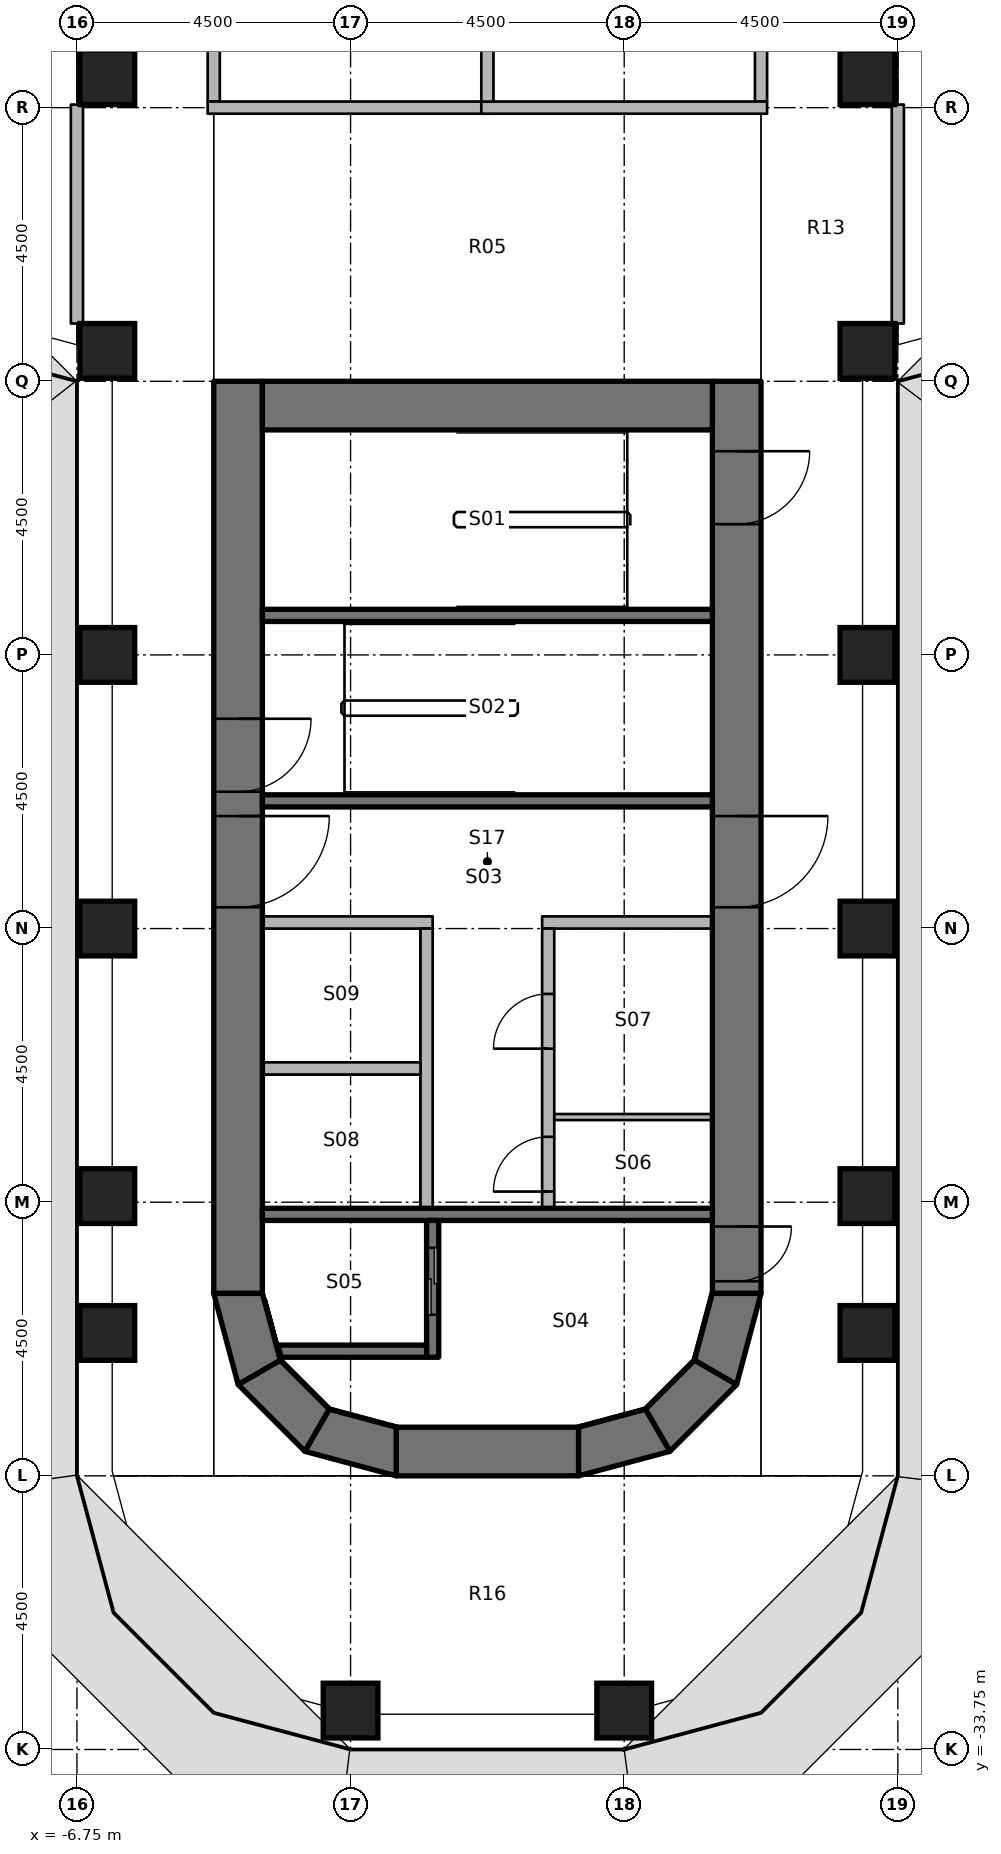
"""IFC4 building model, lengths in metres.
Left out: names, types, materials, properties, quantities, classifications, styles, units other than length and angle.
Written with IfcOpenShell. Run it as: python <this file> out.ifc"""

import sys

from ifc_helpers import new_model, si_unit, direction, frame, frame_2d, origin, origin_2d, place, context, subcontext, project, spatial, polyline, rectangle, outline, extrude, element, fill, save


model = new_model("IFC4")
c1 = context("Model", 3, precision=1e-05, world=origin(), true_north=direction((0.0, 1.0)))
c2 = subcontext(c1, "Body", "Model", "MODEL_VIEW")
j1 = project(units=[si_unit("LENGTHUNIT", "METRE"), si_unit("PLANEANGLEUNIT", "RADIAN")], contexts=[c1])
p1 = place(None, origin())
s1 = spatial("IfcSite", under=j1, at=p1, CompositionType="ELEMENT")
p2 = place(p1, origin())
s2 = spatial("IfcBuilding", under=s1, at=p2, CompositionType="ELEMENT")
p3 = place(p2, frame((0.0, 0.0, 98.0)))
s3 = spatial("IfcBuildingStorey", under=s2, at=p3, CompositionType="ELEMENT", Elevation=98.0)
for number, where, z_axis, x_axis in (
    (1, (-6.25, -26.9, 0.0), (0.0, 0.0, 1.0), (1.0, 0.0, 0.0)),
    (2, (-6.25, -24.65, 0.0), (0.0, 0.0, 1.0), (1.0, 0.0, 0.0)),
    (3, (-6.25, -20.25, 0.0), (0.0, 0.0, 1.0), (1.0, 0.0, 0.0)),
    (4, (-6.25, -15.75, 0.0), (0.0, 0.0, 1.0), (1.0, 0.0, 0.0)),
    (5, (-6.25, -10.75, 0.0), (0.0, 0.0, 1.0), (1.0, 0.0, 0.0)),
    (6, (-6.25, -6.25, 0.0), (0.0, 0.0, 1.0), (1.0, 0.0, 0.0)),
    (7, (-2.25, -33.11, 0.0), (0.0, 0.0, 1.0), (1.0, 0.0, 0.0)),
    (8, (2.25, -33.11, 0.0), (0.0, 0.0, 1.0), (1.0, 0.0, 0.0)),
    (9, (6.25, -26.9, 0.0), (0.0, 0.0, 1.0), (1.0, 0.0, 0.0)),
    (10, (6.25, -24.65, 0.0), (0.0, 0.0, 1.0), (1.0, 0.0, 0.0)),
    (11, (6.25, -20.25, 0.0), (0.0, 0.0, 1.0), (1.0, 0.0, 0.0)),
    (12, (6.25, -15.75, 0.0), (0.0, 0.0, 1.0), (1.0, 0.0, 0.0)),
    (13, (6.25, -10.75, 0.0), (0.0, 0.0, 1.0), (1.0, 0.0, 0.0)),
    (14, (6.25, -6.25, 0.0), (0.0, 0.0, 1.0), (1.0, 0.0, 0.0)),
):
    element("IfcColumn", number, at=place(p3, frame(where, z_axis=z_axis, x_axis=x_axis)), inside=s3, PredefinedType="COLUMN", context=c2, shape_type="SweptSolid", body=[
        extrude(rectangle(XDim=0.9, YDim=0.9, at=origin_2d()), origin(), (0.0, 0.0, 1.0), 3.65),
    ])
p4 = place(p3, frame((-4.1, -11.25, 0.0), z_axis=(0.0, 0.0, 1.0), x_axis=(0.0, -1.0, 0.0)))
e15 = element("IfcWall", 15, at=p4, inside=s3, PredefinedType="SHEAR", context=c2, shape_type="SweptSolid", body=[
    extrude(rectangle(XDim=15.0, YDim=0.8, at=frame_2d((7.5, 0.0))), origin(), (0.0, 0.0, 1.0), 3.8),
])
p5 = place(p4, frame((7.15, 0.0, 0.0)))
e16 = element("IfcOpeningElement", 16, at=p5, cuts=e15, PredefinedType="OPENING", context=c2, shape_type="SweptSolid", body=[
    extrude(rectangle(XDim=1.5, YDim=2.3, at=frame_2d((0.75, 1.15))), frame((0.0, 0.41, 0.0), z_axis=(0.0, -1.0, 0.0), x_axis=(1.0, 0.0, 0.0)), (0.0, 0.0, 1.0), 0.82),
])
p6 = place(p4, frame((5.55, 0.0, 0.0)))
e17 = element("IfcOpeningElement", 17, at=p6, cuts=e15, PredefinedType="OPENING", context=c2, shape_type="SweptSolid", body=[
    extrude(rectangle(XDim=1.2, YDim=2.1, at=frame_2d((0.6, 1.05))), frame((0.0, 0.41, 0.0), z_axis=(0.0, -1.0, 0.0), x_axis=(1.0, 0.0, 0.0)), (0.0, 0.0, 1.0), 0.82),
])
p7 = place(p3, frame((4.1, -11.25, 0.0), z_axis=(0.0, 0.0, 1.0), x_axis=(0.0, -1.0, 0.0)))
e18 = element("IfcWall", 18, at=p7, inside=s3, PredefinedType="SHEAR", context=c2, shape_type="SweptSolid", body=[
    extrude(rectangle(XDim=15.0, YDim=0.8, at=frame_2d((7.5, 0.0))), origin(), (0.0, 0.0, 1.0), 3.8),
])
p8 = place(p7, frame((7.15, 0.0, 0.0)))
e19 = element("IfcOpeningElement", 19, at=p8, cuts=e18, PredefinedType="OPENING", context=c2, shape_type="SweptSolid", body=[
    extrude(rectangle(XDim=1.5, YDim=2.3, at=frame_2d((0.75, 1.15))), frame((0.0, 0.41, 0.0), z_axis=(0.0, -1.0, 0.0), x_axis=(1.0, 0.0, 0.0)), (0.0, 0.0, 1.0), 0.82),
])
p9 = place(p7, frame((13.9, 0.0, 0.0)))
e20 = element("IfcOpeningElement", 20, at=p9, cuts=e18, PredefinedType="OPENING", context=c2, shape_type="SweptSolid", body=[
    extrude(rectangle(XDim=0.9, YDim=2.1, at=frame_2d((0.45, 1.05))), frame((0.0, 0.41, 0.0), z_axis=(0.0, -1.0, 0.0), x_axis=(1.0, 0.0, 0.0)), (0.0, 0.0, 1.0), 0.82),
])
p10 = place(p7, frame((1.15, 0.0, 0.0)))
e21 = element("IfcOpeningElement", 21, at=p10, cuts=e18, PredefinedType="OPENING", context=c2, shape_type="SweptSolid", body=[
    extrude(rectangle(XDim=1.2, YDim=2.1, at=frame_2d((0.6, 1.05))), frame((0.0, 0.41, 0.0), z_axis=(0.0, -1.0, 0.0), x_axis=(1.0, 0.0, 0.0)), (0.0, 0.0, 1.0), 0.82),
])
p11 = place(p3, frame((-3.7, -11.65, 0.0), z_axis=(0.0, 0.0, 1.0), x_axis=(1.0, 0.0, 0.0)))
e22 = element("IfcWall", 22, at=p11, inside=s3, PredefinedType="SHEAR", context=c2, shape_type="SweptSolid", body=[
    extrude(rectangle(XDim=7.4, YDim=0.8, at=frame_2d((3.7, 0.0))), origin(), (0.0, 0.0, 1.0), 3.8),
])
p12 = place(p3, frame((-1.5, -28.85, 0.0), z_axis=(0.0, 0.0, 1.0), x_axis=(1.0, 0.0, 0.0)))
e23 = element("IfcWall", 23, at=p12, inside=s3, PredefinedType="SHEAR", context=c2, shape_type="SweptSolid", body=[
    extrude(rectangle(XDim=3.0, YDim=0.8, at=frame_2d((1.5, 0.0))), origin(), (0.0, 0.0, 1.0), 3.8),
])
p13 = place(p3, origin())
e24 = element("IfcWall", 24, at=p13, inside=s3, PredefinedType="SHEAR", context=c2, shape_type="SweptSolid", body=[
    extrude(outline(polyline([(-4.5, -26.25), (-4.098, -27.75), (-3.405, -27.35), (-3.7, -26.25), (-4.5, -26.25)])), origin(), (0.0, 0.0, 1.0), 3.8),
])
p14 = place(p3, origin())
e25 = element("IfcWall", 25, at=p14, inside=s3, PredefinedType="SHEAR", context=c2, shape_type="SweptSolid", body=[
    extrude(outline(polyline([(-4.098, -27.75), (-3.0, -28.848), (-2.6, -28.155), (-3.405, -27.35), (-4.098, -27.75)])), origin(), (0.0, 0.0, 1.0), 3.8),
])
p15 = place(p3, origin())
e26 = element("IfcWall", 26, at=p15, inside=s3, PredefinedType="SHEAR", context=c2, shape_type="SweptSolid", body=[
    extrude(outline(polyline([(-3.0, -28.848), (-1.5, -29.25), (-1.5, -28.45), (-2.6, -28.155), (-3.0, -28.848)])), origin(), (0.0, 0.0, 1.0), 3.8),
])
p16 = place(p3, origin())
e27 = element("IfcWall", 27, at=p16, inside=s3, PredefinedType="SHEAR", context=c2, shape_type="SweptSolid", body=[
    extrude(outline(polyline([(4.5, -26.25), (4.098, -27.75), (3.405, -27.35), (3.7, -26.25), (4.5, -26.25)])), origin(), (0.0, 0.0, 1.0), 3.8),
])
p17 = place(p3, origin())
e28 = element("IfcWall", 28, at=p17, inside=s3, PredefinedType="SHEAR", context=c2, shape_type="SweptSolid", body=[
    extrude(outline(polyline([(4.098, -27.75), (3.0, -28.848), (2.6, -28.155), (3.405, -27.35), (4.098, -27.75)])), origin(), (0.0, 0.0, 1.0), 3.8),
])
p18 = place(p3, origin())
e29 = element("IfcWall", 29, at=p18, inside=s3, PredefinedType="SHEAR", context=c2, shape_type="SweptSolid", body=[
    extrude(outline(polyline([(3.0, -28.848), (1.5, -29.25), (1.5, -28.45), (2.6, -28.155), (3.0, -28.848)])), origin(), (0.0, 0.0, 1.0), 3.8),
])
p19 = place(p3, frame((3.7, -24.95, 0.0), z_axis=(0.0, 0.0, 1.0), x_axis=(-1.0, 0.0, 0.0)))
e30 = element("IfcWall", 30, at=p19, inside=s3, PredefinedType="SHEAR", context=c2, shape_type="SweptSolid", body=[
    extrude(rectangle(XDim=7.4, YDim=0.2, at=frame_2d((3.7, 0.0))), origin(), (0.0, 0.0, 1.0), 3.65),
])
p20 = place(p3, frame((-0.9, -27.3, 0.0), z_axis=(0.0, 0.0, 1.0), x_axis=(0.0, 1.0, 0.0)))
e31 = element("IfcWall", 31, at=p20, inside=s3, PredefinedType="SHEAR", context=c2, shape_type="SweptSolid", body=[
    extrude(rectangle(XDim=2.25, YDim=0.2, at=frame_2d((1.125, 0.0))), origin(), (0.0, 0.0, 1.0), 3.65),
])
p21 = place(p20, frame((0.7, 0.0, 0.0)))
e32 = element("IfcOpeningElement", 32, at=p21, cuts=e31, PredefinedType="OPENING", context=c2, shape_type="SweptSolid", body=[
    extrude(rectangle(XDim=1.1, YDim=2.3, at=frame_2d((0.55, 1.15))), frame((0.0, 0.11, 0.0), z_axis=(0.0, -1.0, 0.0), x_axis=(1.0, 0.0, 0.0)), (0.0, 0.0, 1.0), 0.22),
])
p22 = place(p3, origin())
e33 = element("IfcWall", 33, at=p22, inside=s3, PredefinedType="SHEAR", context=c2, shape_type="SweptSolid", body=[
    extrude(outline(polyline([(-1.0, -27.1), (-3.444, -27.1), (-3.39, -27.3), (-1.0, -27.3), (-1.0, -27.1)])), origin(), (0.0, 0.0, 1.0), 3.65),
])
for number, where, z_axis, x_axis in (
    (34, (3.7, -18.15, 0.0), (0.0, 0.0, 1.0), (-1.0, 0.0, 0.0)),
    (35, (3.7, -15.1, 0.0), (0.0, 0.0, 1.0), (-1.0, 0.0, 0.0)),
):
    element("IfcWall", number, at=place(p3, frame(where, z_axis=z_axis, x_axis=x_axis)), inside=s3, PredefinedType="SHEAR", context=c2, shape_type="SweptSolid", body=[
        extrude(rectangle(XDim=7.4, YDim=0.2, at=frame_2d((3.7, 0.0))), origin(), (0.0, 0.0, 1.0), 3.65),
    ])
p23 = place(p3, frame((3.7, -20.15, 0.0), z_axis=(0.0, 0.0, 1.0), x_axis=(-1.0, 0.0, 0.0)))
e36 = element("IfcWall", 36, at=p23, inside=s3, PredefinedType="PARTITIONING", context=c2, shape_type="SweptSolid", body=[
    extrude(rectangle(XDim=2.8, YDim=0.2, at=frame_2d((1.4, 0.0))), origin(), (0.0, 0.0, 1.0), 3.65),
])
p24 = place(p3, frame((1.0, -24.85, 0.0), z_axis=(0.0, 0.0, 1.0), x_axis=(0.0, 1.0, 0.0)))
e37 = element("IfcWall", 37, at=p24, inside=s3, PredefinedType="PARTITIONING", context=c2, shape_type="SweptSolid", body=[
    extrude(rectangle(XDim=4.6, YDim=0.2, at=frame_2d((2.3, 0.0))), origin(), (0.0, 0.0, 1.0), 3.65),
])
p25 = place(p24, frame((0.275, 0.0, 0.0)))
e38 = element("IfcOpeningElement", 38, at=p25, cuts=e37, PredefinedType="OPENING", context=c2, shape_type="SweptSolid", body=[
    extrude(rectangle(XDim=0.9, YDim=2.1, at=frame_2d((0.45, 1.05))), frame((0.0, 0.11, 0.0), z_axis=(0.0, -1.0, 0.0), x_axis=(1.0, 0.0, 0.0)), (0.0, 0.0, 1.0), 0.22),
])
p26 = place(p24, frame((2.625, 0.0, 0.0)))
e39 = element("IfcOpeningElement", 39, at=p26, cuts=e37, PredefinedType="OPENING", context=c2, shape_type="SweptSolid", body=[
    extrude(rectangle(XDim=0.9, YDim=2.1, at=frame_2d((0.45, 1.05))), frame((0.0, 0.11, 0.0), z_axis=(0.0, -1.0, 0.0), x_axis=(1.0, 0.0, 0.0)), (0.0, 0.0, 1.0), 0.22),
])
p27 = place(p3, frame((-0.9, -20.15, 0.0), z_axis=(0.0, 0.0, 1.0), x_axis=(-1.0, 0.0, 0.0)))
e40 = element("IfcWall", 40, at=p27, inside=s3, PredefinedType="PARTITIONING", context=c2, shape_type="SweptSolid", body=[
    extrude(rectangle(XDim=2.8, YDim=0.2, at=frame_2d((1.4, 0.0))), origin(), (0.0, 0.0, 1.0), 3.65),
])
p28 = place(p3, frame((-1.0, -24.85, 0.0), z_axis=(0.0, 0.0, 1.0), x_axis=(0.0, 1.0, 0.0)))
e41 = element("IfcWall", 41, at=p28, inside=s3, PredefinedType="PARTITIONING", context=c2, shape_type="SweptSolid", body=[
    extrude(rectangle(XDim=4.6, YDim=0.2, at=frame_2d((2.3, 0.0))), origin(), (0.0, 0.0, 1.0), 3.65),
])
p29 = place(p3, frame((3.7, -23.35, 0.0), z_axis=(0.0, 0.0, 1.0), x_axis=(-1.0, 0.0, 0.0)))
e42 = element("IfcWall", 42, at=p29, inside=s3, PredefinedType="PARTITIONING", context=c2, shape_type="SweptSolid", body=[
    extrude(rectangle(XDim=2.6, YDim=0.1, at=frame_2d((1.3, 0.0))), origin(), (0.0, 0.0, 1.0), 3.65),
])
p30 = place(p3, frame((-1.1, -22.55, 0.0), z_axis=(0.0, 0.0, 1.0), x_axis=(-1.0, 0.0, 0.0)))
e43 = element("IfcWall", 43, at=p30, inside=s3, PredefinedType="PARTITIONING", context=c2, shape_type="SweptSolid", body=[
    extrude(rectangle(XDim=2.6, YDim=0.2, at=frame_2d((1.3, 0.0))), origin(), (0.0, 0.0, 1.0), 3.65),
])
p31 = place(p3, frame((-4.5, 6.65, 0.0), z_axis=(0.0, 0.0, 1.0), x_axis=(0.0, -1.0, 0.0)))
e44 = element("IfcWall", 44, at=p31, inside=s3, PredefinedType="PARTITIONING", context=c2, shape_type="SweptSolid", body=[
    extrude(rectangle(XDim=13.3, YDim=0.2, at=frame_2d((6.65, 0.0))), origin(), (0.0, 0.0, 1.0), 2.738),
])
p32 = place(p31, frame((6.15, 0.0, 0.0)))
e45 = element("IfcOpeningElement", 45, at=p32, cuts=e44, PredefinedType="OPENING", context=c2, shape_type="SweptSolid", body=[
    extrude(rectangle(XDim=1.0, YDim=2.1, at=frame_2d((0.5, 1.05))), frame((0.0, 0.11, 0.0), z_axis=(0.0, -1.0, 0.0), x_axis=(1.0, 0.0, 0.0)), (0.0, 0.0, 1.0), 0.22),
])
p33 = place(p3, frame((-6.75, -10.3, 0.0), z_axis=(0.0, 0.0, 1.0), x_axis=(0.0, 1.0, 0.0)))
e46 = element("IfcWall", 46, at=p33, inside=s3, PredefinedType="PARTITIONING", context=c2, shape_type="SweptSolid", body=[
    extrude(rectangle(XDim=3.6, YDim=0.2, at=frame_2d((1.8, 0.0))), origin(), (0.0, 0.0, 1.0), 2.738),
])
p34 = place(p3, frame((4.5, -6.65, 0.0), z_axis=(0.0, 0.0, 1.0), x_axis=(0.0, 1.0, 0.0)))
e47 = element("IfcWall", 47, at=p34, inside=s3, PredefinedType="PARTITIONING", context=c2, shape_type="SweptSolid", body=[
    extrude(rectangle(XDim=6.55, YDim=0.2, at=frame_2d((3.275, 0.0))), origin(), (0.0, 0.0, 1.0), 2.738),
])
p35 = place(p34, frame((2.775, 0.0, 0.0)))
e48 = element("IfcOpeningElement", 48, at=p35, cuts=e47, PredefinedType="OPENING", context=c2, shape_type="SweptSolid", body=[
    extrude(rectangle(XDim=1.0, YDim=2.1, at=frame_2d((0.5, 1.05))), frame((0.0, 0.11, 0.0), z_axis=(0.0, -1.0, 0.0), x_axis=(1.0, 0.0, 0.0)), (0.0, 0.0, 1.0), 0.22),
])
p36 = place(p3, frame((6.75, -10.3, 0.0), z_axis=(0.0, 0.0, 1.0), x_axis=(0.0, 1.0, 0.0)))
e49 = element("IfcWall", 49, at=p36, inside=s3, PredefinedType="PARTITIONING", context=c2, shape_type="SweptSolid", body=[
    extrude(rectangle(XDim=3.6, YDim=0.2, at=frame_2d((1.8, 0.0))), origin(), (0.0, 0.0, 1.0), 2.738),
])
for number, where, z_axis, x_axis in (
    (50, (-4.6, -6.75, 0.0), (0.0, 0.0, 1.0), (1.0, 0.0, 0.0)),
    (51, (-0.1, -6.75, 0.0), (0.0, 0.0, 1.0), (1.0, 0.0, 0.0)),
):
    element("IfcWall", number, at=place(p3, frame(where, z_axis=z_axis, x_axis=x_axis)), inside=s3, PredefinedType="PARTITIONING", context=c2, shape_type="SweptSolid", body=[
        extrude(rectangle(XDim=4.7, YDim=0.2, at=frame_2d((2.35, 0.0))), origin(), (0.0, 0.0, 1.0), 2.738),
    ])
p37 = place(p3, frame((0.0, -6.65, 0.0), z_axis=(0.0, 0.0, 1.0), x_axis=(0.0, 1.0, 0.0)))
e52 = element("IfcWall", 52, at=p37, inside=s3, PredefinedType="PARTITIONING", context=c2, shape_type="SweptSolid", body=[
    extrude(rectangle(XDim=6.55, YDim=0.2, at=frame_2d((3.275, 0.0))), origin(), (0.0, 0.0, 1.0), 2.738),
])
p38 = place(p8, origin())
e53 = element("IfcDoor", 53, at=p38, inside=s3, OperationType="DOUBLE_DOOR_SINGLE_SWING", PredefinedType="DOOR", context=c2, shape_type="SweptSolid", body=[
    extrude(rectangle(XDim=1.5, YDim=2.3, at=frame_2d((0.75, 1.15))), frame((0.0, 0.025, 0.0), z_axis=(0.0, -1.0, 0.0), x_axis=(1.0, 0.0, 0.0)), (0.0, 0.0, 1.0), 0.05),
])
fill(e19, e53)
p39 = place(p5, origin())
e54 = element("IfcDoor", 54, at=p39, inside=s3, OperationType="DOUBLE_DOOR_SINGLE_SWING", PredefinedType="DOOR", context=c2, shape_type="SweptSolid", body=[
    extrude(rectangle(XDim=1.5, YDim=2.3, at=frame_2d((0.75, 1.15))), frame((0.0, 0.025, 0.0), z_axis=(0.0, -1.0, 0.0), x_axis=(1.0, 0.0, 0.0)), (0.0, 0.0, 1.0), 0.05),
])
fill(e16, e54)
p40 = place(p9, origin())
e55 = element("IfcDoor", 55, at=p40, inside=s3, OperationType="SINGLE_SWING_RIGHT", PredefinedType="DOOR", context=c2, shape_type="SweptSolid", body=[
    extrude(rectangle(XDim=0.9, YDim=2.1, at=frame_2d((0.45, 1.05))), frame((0.0, 0.025, 0.0), z_axis=(0.0, -1.0, 0.0), x_axis=(1.0, 0.0, 0.0)), (0.0, 0.0, 1.0), 0.05),
])
fill(e20, e55)
p41 = place(p6, origin())
e56 = element("IfcDoor", 56, at=p41, inside=s3, OperationType="SINGLE_SWING_LEFT", PredefinedType="DOOR", context=c2, shape_type="SweptSolid", body=[
    extrude(rectangle(XDim=1.2, YDim=2.1, at=frame_2d((0.6, 1.05))), frame((0.0, 0.025, 0.0), z_axis=(0.0, -1.0, 0.0), x_axis=(1.0, 0.0, 0.0)), (0.0, 0.0, 1.0), 0.05),
])
fill(e17, e56)
p42 = place(p10, origin())
e57 = element("IfcDoor", 57, at=p42, inside=s3, OperationType="SINGLE_SWING_RIGHT", PredefinedType="DOOR", context=c2, shape_type="SweptSolid", body=[
    extrude(rectangle(XDim=1.2, YDim=2.1, at=frame_2d((0.6, 1.05))), frame((0.0, 0.025, 0.0), z_axis=(0.0, -1.0, 0.0), x_axis=(1.0, 0.0, 0.0)), (0.0, 0.0, 1.0), 0.05),
])
fill(e21, e57)
p43 = place(p21, origin())
e58 = element("IfcDoor", 58, at=p43, inside=s3, OperationType="DOUBLE_DOOR_SLIDING", PredefinedType="DOOR", context=c2, shape_type="SweptSolid", body=[
    extrude(rectangle(XDim=1.1, YDim=2.3, at=frame_2d((0.55, 1.15))), frame((0.0, 0.025, 0.0), z_axis=(0.0, -1.0, 0.0), x_axis=(1.0, 0.0, 0.0)), (0.0, 0.0, 1.0), 0.05),
])
fill(e32, e58)
p44 = place(p25, origin())
e59 = element("IfcDoor", 59, at=p44, inside=s3, OperationType="SINGLE_SWING_LEFT", PredefinedType="DOOR", context=c2, shape_type="SweptSolid", body=[
    extrude(rectangle(XDim=0.9, YDim=2.1, at=frame_2d((0.45, 1.05))), frame((0.0, 0.025, 0.0), z_axis=(0.0, -1.0, 0.0), x_axis=(1.0, 0.0, 0.0)), (0.0, 0.0, 1.0), 0.05),
])
fill(e38, e59)
p45 = place(p26, origin())
e60 = element("IfcDoor", 60, at=p45, inside=s3, OperationType="SINGLE_SWING_LEFT", PredefinedType="DOOR", context=c2, shape_type="SweptSolid", body=[
    extrude(rectangle(XDim=0.9, YDim=2.1, at=frame_2d((0.45, 1.05))), frame((0.0, 0.025, 0.0), z_axis=(0.0, -1.0, 0.0), x_axis=(1.0, 0.0, 0.0)), (0.0, 0.0, 1.0), 0.05),
])
fill(e39, e60)
save(model, sys.argv[1])
